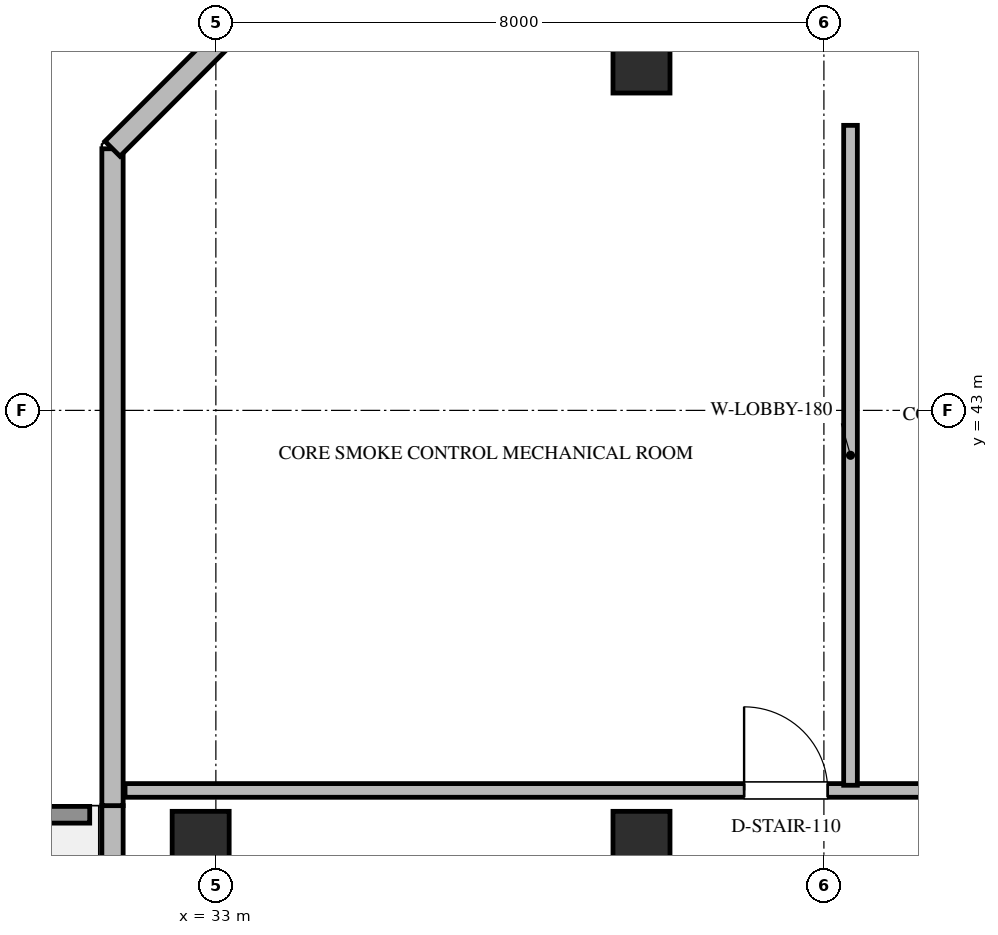
"""IFC4 building model, lengths in metres.
Left out: names, types, materials, properties, quantities, classifications, styles, units other than length and angle.
Written with IfcOpenShell. Run it as: python <this file> out.ifc"""

import sys

from ifc_helpers import new_model, si_unit, direction, frame, frame_2d, origin, origin_2d, place, context, subcontext, project, spatial, rectangle, extrude, element, fill, save


model = new_model("IFC4")
c1 = context("Model", 3, precision=1e-05, world=origin(), true_north=direction((0.0, 1.0)))
c2 = subcontext(c1, "Body", "Model", "MODEL_VIEW")
j1 = project(units=[si_unit("LENGTHUNIT", "METRE"), si_unit("PLANEANGLEUNIT", "RADIAN")], contexts=[c1])
p1 = place(None, origin())
s1 = spatial("IfcSite", under=j1, at=p1, CompositionType="ELEMENT")
p2 = place(p1, origin())
s2 = spatial("IfcBuilding", under=s1, at=p2, CompositionType="ELEMENT")
p3 = place(p2, frame((0.0, 0.0, 277.8)))
s3 = spatial("IfcBuildingStorey", under=s2, at=p3, CompositionType="ELEMENT", Elevation=277.8)
for number, where, z_axis, x_axis in (
    (1, (38.6, 37.35, 0.0), (0.0, 0.0, 1.0), (1.0, 0.0, 0.0)),
    (2, (38.6, 47.55, 0.0), (0.0, 0.0, 1.0), (1.0, 0.0, 0.0)),
    (3, (32.8, 37.35, 0.0), (0.0, 0.0, 1.0), (1.0, 0.0, 0.0)),
):
    element("IfcColumn", number, at=place(p3, frame(where, z_axis=z_axis, x_axis=x_axis)), inside=s3, PredefinedType="COLUMN", context=c2, shape_type="SweptSolid", body=[
        extrude(rectangle(XDim=0.75, YDim=0.75, at=origin_2d()), origin(), (0.0, 0.0, 1.0), 4.5),
    ])
p4 = place(p3, frame((28.12, 37.68, 0.0), z_axis=(0.0, 0.0, 1.0), x_axis=(1.0, 0.0, 0.0)))
e4 = element("IfcWall", 4, at=p4, inside=s3, PredefinedType="PARAPET", context=c2, shape_type="SweptSolid", body=[
    extrude(rectangle(XDim=3.22, YDim=0.22, at=frame_2d((1.61, 0.0))), origin(), (0.0, 0.0, 1.0), 1.2),
])
p5 = place(p3, frame((31.64, 20.198, 0.0), z_axis=(0.0, 0.0, 1.0), x_axis=(0.0, 1.0, 0.0)))
e5 = element("IfcWall", 5, at=p5, inside=s3, PredefinedType="STANDARD", context=c2, shape_type="SweptSolid", body=[
    extrude(rectangle(XDim=17.602, YDim=0.28, at=frame_2d((8.801, 0.0))), origin(), (0.0, 0.0, 1.0), 4.265),
])
p6 = place(p3, frame((31.64, 37.8, 0.0), z_axis=(0.0, 0.0, 1.0), x_axis=(0.0, 1.0, 0.0)))
e6 = element("IfcWall", 6, at=p6, inside=s3, PredefinedType="STANDARD", context=c2, shape_type="SweptSolid", body=[
    extrude(rectangle(XDim=8.642, YDim=0.28, at=frame_2d((4.321, 0.0))), origin(), (0.0, 0.0, 1.0), 4.265),
])
p7 = place(p3, frame((31.64, 46.442, 0.0), z_axis=(0.0, 0.0, 1.0), x_axis=(0.707106781187, 0.707106781187, 0.0)))
e7 = element("IfcWall", 7, at=p7, inside=s3, PredefinedType="STANDARD", context=c2, shape_type="SweptSolid", body=[
    extrude(rectangle(XDim=2.713, YDim=0.28, at=frame_2d((1.356, 0.0))), origin(), (0.0, 0.0, 1.0), 4.265),
])
p8 = place(p3, frame((31.805, 38.0, 0.0), z_axis=(0.0, 0.0, 1.0), x_axis=(1.0, 0.0, 0.0)))
e8 = element("IfcWall", 8, at=p8, inside=s3, PredefinedType="STANDARD", context=c2, shape_type="SweptSolid", body=[
    extrude(rectangle(XDim=13.245, YDim=0.18, at=frame_2d((6.623, 0.0))), origin(), (0.0, 0.0, 1.0), 3.654),
])
p9 = place(p8, frame((8.145, 0.0, 0.0)))
e9 = element("IfcOpeningElement", 9, at=p9, cuts=e8, PredefinedType="OPENING", context=c2, shape_type="SweptSolid", body=[
    extrude(rectangle(XDim=1.1, YDim=2.2, at=frame_2d((0.55, 1.1))), frame((0.0, 0.1, 0.0), z_axis=(0.0, -1.0, 0.0), x_axis=(1.0, 0.0, 0.0)), (0.0, 0.0, 1.0), 0.2),
])
p10 = place(p8, frame((10.72, 0.0, 0.0)))
e10 = element("IfcOpeningElement", 10, at=p10, cuts=e8, PredefinedType="OPENING", context=c2, shape_type="SweptSolid", body=[
    extrude(rectangle(XDim=1.1, YDim=2.2, at=frame_2d((0.55, 1.1))), frame((0.0, 0.1, 0.0), z_axis=(0.0, -1.0, 0.0), x_axis=(1.0, 0.0, 0.0)), (0.0, 0.0, 1.0), 0.2),
])
p11 = place(p3, frame((41.35, 38.068, 0.0), z_axis=(0.0, 0.0, 1.0), x_axis=(0.0, 1.0, 0.0)))
e11 = element("IfcWall", 11, at=p11, inside=s3, PredefinedType="STANDARD", context=c2, shape_type="SweptSolid", body=[
    extrude(rectangle(XDim=8.682, YDim=0.18, at=frame_2d((4.341, 0.0))), origin(), (0.0, 0.0, 1.0), 4.265),
])
p12 = place(p9, origin())
e12 = element("IfcDoor", 12, at=p12, inside=s3, OperationType="SINGLE_SWING_LEFT", PredefinedType="DOOR", context=c2, shape_type="SweptSolid", body=[
    extrude(rectangle(XDim=1.1, YDim=2.2, at=frame_2d((0.55, 1.1))), frame((0.0, 0.025, 0.0), z_axis=(0.0, -1.0, 0.0), x_axis=(1.0, 0.0, 0.0)), (0.0, 0.0, 1.0), 0.05),
])
fill(e9, e12)
save(model, sys.argv[1])
